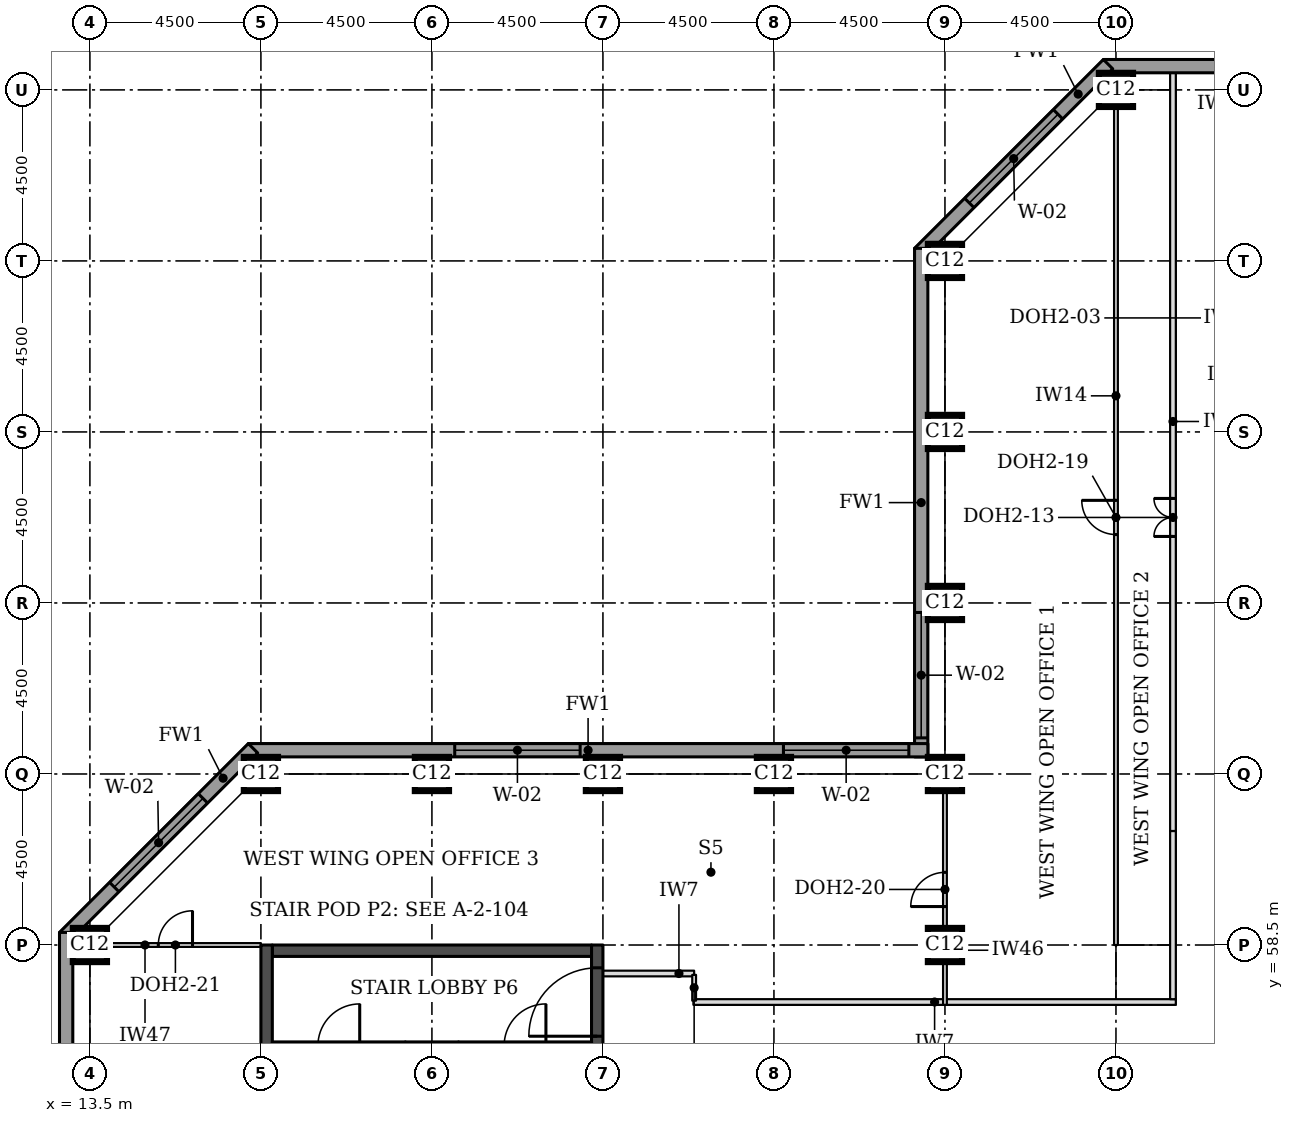
"""IFC4 building model, lengths in metres.
Left out: names, types, materials, properties, quantities, classifications, styles, units other than length and angle.
Written with IfcOpenShell. Run it as: python <this file> out.ifc"""

import sys

from ifc_helpers import new_model, si_unit, direction, frame, frame_2d, origin, origin_2d, place, context, subcontext, project, spatial, rectangle, extrude, element, fill, save


model = new_model("IFC4")
c1 = context("Model", 3, precision=1e-05, world=origin(), true_north=direction((0.0, 1.0)))
c2 = subcontext(c1, "Body", "Model", "MODEL_VIEW")
j1 = project(units=[si_unit("LENGTHUNIT", "METRE"), si_unit("PLANEANGLEUNIT", "RADIAN")], contexts=[c1])
p1 = place(None, origin())
s1 = spatial("IfcSite", under=j1, at=p1, CompositionType="ELEMENT")
p2 = place(p1, origin())
s2 = spatial("IfcBuilding", under=s1, at=p2, CompositionType="ELEMENT")
p3 = place(p2, frame((0.0, 0.0, 155.1)))
s3 = spatial("IfcBuildingStorey", under=s2, at=p3, CompositionType="ELEMENT", Elevation=155.1)
for number, where, z_axis, x_axis in (
    (1, (13.5, 58.5, 0.0), (0.0, 0.0, 1.0), (1.0, 0.0, 0.0)),
    (2, (36.0, 58.5, 0.0), (0.0, 0.0, 1.0), (1.0, 0.0, 0.0)),
    (3, (18.0, 63.0, 0.0), (0.0, 0.0, 1.0), (1.0, 0.0, 0.0)),
    (4, (22.5, 63.0, 0.0), (0.0, 0.0, 1.0), (1.0, 0.0, 0.0)),
    (5, (27.0, 63.0, 0.0), (0.0, 0.0, 1.0), (1.0, 0.0, 0.0)),
    (6, (31.5, 63.0, 0.0), (0.0, 0.0, 1.0), (1.0, 0.0, 0.0)),
    (7, (36.0, 63.0, 0.0), (0.0, 0.0, 1.0), (1.0, 0.0, 0.0)),
    (8, (36.0, 67.5, 0.0), (0.0, 0.0, 1.0), (1.0, 0.0, 0.0)),
    (9, (36.0, 72.0, 0.0), (0.0, 0.0, 1.0), (1.0, 0.0, 0.0)),
    (10, (36.0, 76.5, 0.0), (0.0, 0.0, 1.0), (1.0, 0.0, 0.0)),
    (11, (40.5, 81.0, 0.0), (0.0, 0.0, 1.0), (1.0, 0.0, 0.0)),
):
    element("IfcColumn", number, at=place(p3, frame(where, z_axis=z_axis, x_axis=x_axis)), inside=s3, PredefinedType="COLUMN", context=c2, shape_type="SweptSolid", body=[
        extrude(rectangle(XDim=0.9, YDim=0.9, at=origin_2d()), origin(), (0.0, 0.0, 1.0), 3.7),
    ])
p4 = place(p3, frame((18.3, 58.35, 0.0), z_axis=(0.0, 0.0, 1.0), x_axis=(1.0, 0.0, 0.0)))
e12 = element("IfcWall", 12, at=p4, inside=s3, PredefinedType="SHEAR", context=c2, shape_type="SweptSolid", body=[
    extrude(rectangle(XDim=8.4, YDim=0.3, at=frame_2d((4.2, 0.0))), origin(), (0.0, 0.0, 1.0), 3.7),
])
p5 = place(p3, frame((18.15, 49.5, 0.0), z_axis=(0.0, 0.0, 1.0), x_axis=(0.0, 1.0, 0.0)))
e13 = element("IfcWall", 13, at=p5, inside=s3, PredefinedType="SHEAR", context=c2, shape_type="SweptSolid", body=[
    extrude(rectangle(XDim=9.0, YDim=0.3, at=frame_2d((4.5, 0.0))), origin(), (0.0, 0.0, 1.0), 3.7),
])
p6 = place(p3, frame((26.85, 49.5, 0.0), z_axis=(0.0, 0.0, 1.0), x_axis=(0.0, 1.0, 0.0)))
e14 = element("IfcWall", 14, at=p6, inside=s3, PredefinedType="SHEAR", context=c2, shape_type="SweptSolid", body=[
    extrude(rectangle(XDim=9.0, YDim=0.3, at=frame_2d((4.5, 0.0))), origin(), (0.0, 0.0, 1.0), 3.7),
])
p7 = place(p6, frame((6.6, 0.0, 0.0)))
e15 = element("IfcOpeningElement", 15, at=p7, cuts=e14, PredefinedType="OPENING", context=c2, shape_type="SweptSolid", body=[
    extrude(rectangle(XDim=1.8, YDim=2.1, at=frame_2d((0.9, 1.05))), frame((0.0, 0.16, 0.0), z_axis=(0.0, -1.0, 0.0), x_axis=(1.0, 0.0, 0.0)), (0.0, 0.0, 1.0), 0.32),
])
p8 = place(p3, frame((72.331, 81.625, 0.0), z_axis=(0.0, 0.0, 1.0), x_axis=(-1.0, 0.0, 0.0)))
e16 = element("IfcWall", 16, at=p8, inside=s3, PredefinedType="STANDARD", context=c2, shape_type="SweptSolid", body=[
    extrude(rectangle(XDim=32.163, YDim=0.35, at=frame_2d((16.081, 0.0))), origin(), (0.0, 0.0, 1.0), 3.525),
])
p9 = place(p8, frame((5.431, 0.0, 0.9)))
e17 = element("IfcOpeningElement", 17, at=p9, cuts=e16, PredefinedType="OPENING", context=c2, shape_type="SweptSolid", body=[
    extrude(rectangle(XDim=3.3, YDim=1.9, at=frame_2d((1.65, 0.95))), frame((0.0, 0.185, 0.0), z_axis=(0.0, -1.0, 0.0), x_axis=(1.0, 0.0, 0.0)), (0.0, 0.0, 1.0), 0.37),
])
p10 = place(p8, frame((9.931, 0.0, 0.9)))
e18 = element("IfcOpeningElement", 18, at=p10, cuts=e16, PredefinedType="OPENING", context=c2, shape_type="SweptSolid", body=[
    extrude(rectangle(XDim=3.3, YDim=1.9, at=frame_2d((1.65, 0.95))), frame((0.0, 0.185, 0.0), z_axis=(0.0, -1.0, 0.0), x_axis=(1.0, 0.0, 0.0)), (0.0, 0.0, 1.0), 0.37),
])
p11 = place(p8, frame((14.431, 0.0, 0.9)))
e19 = element("IfcOpeningElement", 19, at=p11, cuts=e16, PredefinedType="OPENING", context=c2, shape_type="SweptSolid", body=[
    extrude(rectangle(XDim=3.3, YDim=1.9, at=frame_2d((1.65, 0.95))), frame((0.0, 0.185, 0.0), z_axis=(0.0, -1.0, 0.0), x_axis=(1.0, 0.0, 0.0)), (0.0, 0.0, 1.0), 0.37),
])
p12 = place(p8, frame((18.931, 0.0, 0.9)))
e20 = element("IfcOpeningElement", 20, at=p12, cuts=e16, PredefinedType="OPENING", context=c2, shape_type="SweptSolid", body=[
    extrude(rectangle(XDim=3.3, YDim=1.9, at=frame_2d((1.65, 0.95))), frame((0.0, 0.185, 0.0), z_axis=(0.0, -1.0, 0.0), x_axis=(1.0, 0.0, 0.0)), (0.0, 0.0, 1.0), 0.37),
])
p13 = place(p8, frame((23.431, 0.0, 0.9)))
e21 = element("IfcOpeningElement", 21, at=p13, cuts=e16, PredefinedType="OPENING", context=c2, shape_type="SweptSolid", body=[
    extrude(rectangle(XDim=3.3, YDim=1.9, at=frame_2d((1.65, 0.95))), frame((0.0, 0.185, 0.0), z_axis=(0.0, -1.0, 0.0), x_axis=(1.0, 0.0, 0.0)), (0.0, 0.0, 1.0), 0.37),
])
p14 = place(p3, frame((40.292, 81.676, 0.0), z_axis=(0.0, 0.0, 1.0), x_axis=(-0.707106781187, -0.707106781187, 0.0)))
e22 = element("IfcWall", 22, at=p14, inside=s3, PredefinedType="STANDARD", context=c2, shape_type="SweptSolid", body=[
    extrude(rectangle(XDim=7.027, YDim=0.35, at=frame_2d((3.513, 0.0))), origin(), (0.0, 0.0, 1.0), 3.525),
])
p15 = place(p14, frame((1.863, 0.0, 0.9)))
e23 = element("IfcOpeningElement", 23, at=p15, cuts=e22, PredefinedType="OPENING", context=c2, shape_type="SweptSolid", body=[
    extrude(rectangle(XDim=3.3, YDim=1.9, at=frame_2d((1.65, 0.95))), frame((0.0, 0.185, 0.0), z_axis=(0.0, -1.0, 0.0), x_axis=(1.0, 0.0, 0.0)), (0.0, 0.0, 1.0), 0.37),
])
p16 = place(p3, frame((35.375, 76.831, 0.0), z_axis=(0.0, 0.0, 1.0), x_axis=(0.0, -1.0, 0.0)))
e24 = element("IfcWall", 24, at=p16, inside=s3, PredefinedType="STANDARD", context=c2, shape_type="SweptSolid", body=[
    extrude(rectangle(XDim=13.381, YDim=0.35, at=frame_2d((6.691, 0.0))), origin(), (0.0, 0.0, 1.0), 3.525),
])
p17 = place(p16, frame((9.581, 0.0, 0.9)))
e25 = element("IfcOpeningElement", 25, at=p17, cuts=e24, PredefinedType="OPENING", context=c2, shape_type="SweptSolid", body=[
    extrude(rectangle(XDim=3.3, YDim=1.9, at=frame_2d((1.65, 0.95))), frame((0.0, 0.185, 0.0), z_axis=(0.0, -1.0, 0.0), x_axis=(1.0, 0.0, 0.0)), (0.0, 0.0, 1.0), 0.37),
])
p18 = place(p3, frame((35.55, 63.625, 0.0), z_axis=(0.0, 0.0, 1.0), x_axis=(-1.0, 0.0, 0.0)))
e26 = element("IfcWall", 26, at=p18, inside=s3, PredefinedType="STANDARD", context=c2, shape_type="SweptSolid", body=[
    extrude(rectangle(XDim=17.881, YDim=0.35, at=frame_2d((8.941, 0.0))), origin(), (0.0, 0.0, 1.0), 3.525),
])
p19 = place(p18, frame((0.5, 0.0, 0.9)))
e27 = element("IfcOpeningElement", 27, at=p19, cuts=e26, PredefinedType="OPENING", context=c2, shape_type="SweptSolid", body=[
    extrude(rectangle(XDim=3.3, YDim=1.9, at=frame_2d((1.65, 0.95))), frame((0.0, 0.185, 0.0), z_axis=(0.0, -1.0, 0.0), x_axis=(1.0, 0.0, 0.0)), (0.0, 0.0, 1.0), 0.37),
])
p20 = place(p18, frame((9.15, 0.0, 0.9)))
e28 = element("IfcOpeningElement", 28, at=p20, cuts=e26, PredefinedType="OPENING", context=c2, shape_type="SweptSolid", body=[
    extrude(rectangle(XDim=3.3, YDim=1.9, at=frame_2d((1.65, 0.95))), frame((0.0, 0.185, 0.0), z_axis=(0.0, -1.0, 0.0), x_axis=(1.0, 0.0, 0.0)), (0.0, 0.0, 1.0), 0.37),
])
p21 = place(p3, frame((17.792, 63.676, 0.0), z_axis=(0.0, 0.0, 1.0), x_axis=(-0.707106781187, -0.707106781187, 0.0)))
e29 = element("IfcWall", 29, at=p21, inside=s3, PredefinedType="STANDARD", context=c2, shape_type="SweptSolid", body=[
    extrude(rectangle(XDim=7.027, YDim=0.35, at=frame_2d((3.513, 0.0))), origin(), (0.0, 0.0, 1.0), 3.525),
])
p22 = place(p21, frame((1.863, 0.0, 0.9)))
e30 = element("IfcOpeningElement", 30, at=p22, cuts=e29, PredefinedType="OPENING", context=c2, shape_type="SweptSolid", body=[
    extrude(rectangle(XDim=3.3, YDim=1.9, at=frame_2d((1.65, 0.95))), frame((0.0, 0.185, 0.0), z_axis=(0.0, -1.0, 0.0), x_axis=(1.0, 0.0, 0.0)), (0.0, 0.0, 1.0), 0.37),
])
p23 = place(p3, frame((12.875, 58.831, 0.0), z_axis=(0.0, 0.0, 1.0), x_axis=(0.0, -1.0, 0.0)))
e31 = element("IfcWall", 31, at=p23, inside=s3, PredefinedType="STANDARD", context=c2, shape_type="SweptSolid", body=[
    extrude(rectangle(XDim=14.163, YDim=0.35, at=frame_2d((7.081, 0.0))), origin(), (0.0, 0.0, 1.0), 3.525),
])
p24 = place(p23, frame((5.431, 0.0, 0.9)))
e32 = element("IfcOpeningElement", 32, at=p24, cuts=e31, PredefinedType="OPENING", context=c2, shape_type="SweptSolid", body=[
    extrude(rectangle(XDim=3.3, YDim=1.9, at=frame_2d((1.65, 0.95))), frame((0.0, 0.185, 0.0), z_axis=(0.0, -1.0, 0.0), x_axis=(1.0, 0.0, 0.0)), (0.0, 0.0, 1.0), 0.37),
])
p25 = place(p3, frame((29.38, 57.0, 0.0), z_axis=(0.0, 0.0, 1.0), x_axis=(1.0, 0.0, 0.0)))
e33 = element("IfcWall", 33, at=p25, inside=s3, PredefinedType="PARTITIONING", context=c2, shape_type="SweptSolid", body=[
    extrude(rectangle(XDim=12.695, YDim=0.15, at=frame_2d((6.348, 0.0))), origin(), (0.0, 0.0, 1.0), 3.55),
])
p26 = place(p3, frame((42.0, 57.075, 0.0), z_axis=(0.0, 0.0, 1.0), x_axis=(0.0, 1.0, 0.0)))
e34 = element("IfcWall", 34, at=p26, inside=s3, PredefinedType="PARTITIONING", context=c2, shape_type="SweptSolid", body=[
    extrude(rectangle(XDim=4.425, YDim=0.15, at=frame_2d((2.212, 0.0))), origin(), (0.0, 0.0, 1.0), 3.55),
])
p27 = place(p3, frame((42.0, 61.5, 0.0), z_axis=(0.0, 0.0, 1.0), x_axis=(0.0, 1.0, 0.0)))
e35 = element("IfcWall", 35, at=p27, inside=s3, PredefinedType="PARTITIONING", context=c2, shape_type="SweptSolid", body=[
    extrude(rectangle(XDim=19.95, YDim=0.15, at=frame_2d((9.975, 0.0))), origin(), (0.0, 0.0, 1.0), 3.55),
])
p28 = place(p27, frame((7.75, 0.0, 0.0)))
e36 = element("IfcOpeningElement", 36, at=p28, cuts=e35, PredefinedType="OPENING", context=c2, shape_type="SweptSolid", body=[
    extrude(rectangle(XDim=1.0, YDim=2.1, at=frame_2d((0.5, 1.05))), frame((0.0, 0.085, 0.0), z_axis=(0.0, -1.0, 0.0), x_axis=(1.0, 0.0, 0.0)), (0.0, 0.0, 1.0), 0.17),
])
p29 = place(p3, frame((40.5, 81.0, 0.0), z_axis=(0.0, 0.0, 1.0), x_axis=(0.0, -1.0, 0.0)))
e37 = element("IfcWall", 37, at=p29, inside=s3, PredefinedType="PARTITIONING", context=c2, shape_type="SweptSolid", body=[
    extrude(rectangle(XDim=22.5, YDim=0.1, at=frame_2d((11.25, 0.0))), origin(), (0.0, 0.0, 1.0), 3.55),
])
p30 = place(p29, frame((10.8, 0.0, 0.0)))
e38 = element("IfcOpeningElement", 38, at=p30, cuts=e37, PredefinedType="OPENING", context=c2, shape_type="SweptSolid", body=[
    extrude(rectangle(XDim=0.9, YDim=2.1, at=frame_2d((0.45, 1.05))), frame((0.0, 0.06, 0.0), z_axis=(0.0, -1.0, 0.0), x_axis=(1.0, 0.0, 0.0)), (0.0, 0.0, 1.0), 0.12),
])
p31 = place(p3, frame((36.0, 63.0, 0.0), z_axis=(0.0, 0.0, 1.0), x_axis=(0.0, -1.0, 0.0)))
e39 = element("IfcWall", 39, at=p31, inside=s3, PredefinedType="PARTITIONING", context=c2, shape_type="SweptSolid", body=[
    extrude(rectangle(XDim=6.075, YDim=0.1, at=frame_2d((3.038, 0.0))), origin(), (0.0, 0.0, 1.0), 2.8),
])
p32 = place(p31, frame((2.588, 0.0, 0.0)))
e40 = element("IfcOpeningElement", 40, at=p32, cuts=e39, PredefinedType="OPENING", context=c2, shape_type="SweptSolid", body=[
    extrude(rectangle(XDim=0.9, YDim=2.1, at=frame_2d((0.45, 1.05))), frame((0.0, 0.06, 0.0), z_axis=(0.0, -1.0, 0.0), x_axis=(1.0, 0.0, 0.0)), (0.0, 0.0, 1.0), 0.12),
])
p33 = place(p3, frame((13.5, 58.5, 0.0), z_axis=(0.0, 0.0, 1.0), x_axis=(1.0, 0.0, 0.0)))
e41 = element("IfcWall", 41, at=p33, inside=s3, PredefinedType="PARTITIONING", context=c2, shape_type="SweptSolid", body=[
    extrude(rectangle(XDim=4.5, YDim=0.1, at=frame_2d((2.25, 0.0))), origin(), (0.0, 0.0, 1.0), 2.55),
])
p34 = place(p33, frame((1.8, 0.0, 0.0)))
e42 = element("IfcOpeningElement", 42, at=p34, cuts=e41, PredefinedType="OPENING", context=c2, shape_type="SweptSolid", body=[
    extrude(rectangle(XDim=0.9, YDim=2.1, at=frame_2d((0.45, 1.05))), frame((0.0, 0.06, 0.0), z_axis=(0.0, -1.0, 0.0), x_axis=(1.0, 0.0, 0.0)), (0.0, 0.0, 1.0), 0.12),
])
p35 = place(p3, frame((27.0, 57.75, 0.0), z_axis=(0.0, 0.0, 1.0), x_axis=(1.0, 0.0, 0.0)))
e43 = element("IfcWall", 43, at=p35, inside=s3, PredefinedType="PARTITIONING", context=c2, shape_type="SweptSolid", body=[
    extrude(rectangle(XDim=2.4, YDim=0.15, at=frame_2d((1.2, 0.0))), origin(), (0.0, 0.0, 1.0), 3.55),
])
p36 = place(p3, frame((29.4, 57.715, 0.0), z_axis=(0.0, 0.0, 1.0), x_axis=(0.0, -1.0, 0.0)))
e44 = element("IfcWall", 44, at=p36, inside=s3, PredefinedType="PARTITIONING", context=c2, shape_type="SweptSolid", body=[
    extrude(rectangle(XDim=0.68, YDim=0.1, at=frame_2d((0.34, 0.0))), origin(), (0.0, 0.0, 1.0), 3.55),
])
p37 = place(p3, frame((21.8, 55.85, 0.0), z_axis=(0.0, 0.0, 1.0), x_axis=(1.0, 0.0, 0.0)))
e45 = element("IfcWall", 45, at=p37, inside=s3, PredefinedType="SOLIDWALL", context=c2, shape_type="SweptSolid", body=[
    extrude(rectangle(XDim=1.4, YDim=0.2, at=frame_2d((0.7, 0.0))), origin(), (0.0, 0.0, 1.0), 3.55),
])
p38 = place(p3, frame((18.3, 55.85, 0.0), z_axis=(0.0, 0.0, 1.0), x_axis=(1.0, 0.0, 0.0)))
e46 = element("IfcWall", 46, at=p38, inside=s3, PredefinedType="SOLIDWALL", context=c2, shape_type="SweptSolid", body=[
    extrude(rectangle(XDim=3.5, YDim=0.2, at=frame_2d((1.75, 0.0))), origin(), (0.0, 0.0, 1.0), 3.55),
])
p39 = place(p38, frame((1.2, 0.0, 0.0)))
e47 = element("IfcOpeningElement", 47, at=p39, cuts=e46, PredefinedType="OPENING", context=c2, shape_type="SweptSolid", body=[
    extrude(rectangle(XDim=1.1, YDim=2.1, at=frame_2d((0.55, 1.05))), frame((0.0, 0.11, 0.0), z_axis=(0.0, -1.0, 0.0), x_axis=(1.0, 0.0, 0.0)), (0.0, 0.0, 1.0), 0.22),
])
p40 = place(p3, frame((23.2, 55.85, 0.0), z_axis=(0.0, 0.0, 1.0), x_axis=(1.0, 0.0, 0.0)))
e48 = element("IfcWall", 48, at=p40, inside=s3, PredefinedType="SOLIDWALL", context=c2, shape_type="SweptSolid", body=[
    extrude(rectangle(XDim=3.5, YDim=0.2, at=frame_2d((1.75, 0.0))), origin(), (0.0, 0.0, 1.0), 3.55),
])
p41 = place(p40, frame((1.2, 0.0, 0.0)))
e49 = element("IfcOpeningElement", 49, at=p41, cuts=e48, PredefinedType="OPENING", context=c2, shape_type="SweptSolid", body=[
    extrude(rectangle(XDim=1.1, YDim=2.1, at=frame_2d((0.55, 1.05))), frame((0.0, 0.11, 0.0), z_axis=(0.0, -1.0, 0.0), x_axis=(1.0, 0.0, 0.0)), (0.0, 0.0, 1.0), 0.22),
])
p42 = place(p15, origin())
e50 = element("IfcWindow", 50, at=p42, inside=s3, PartitioningType="SINGLE_PANEL", PredefinedType="WINDOW", context=c2, shape_type="SweptSolid", body=[
    extrude(rectangle(XDim=3.3, YDim=1.9, at=frame_2d((1.65, 0.95))), frame((0.0, 0.085, 0.0), z_axis=(0.0, -1.0, 0.0), x_axis=(1.0, 0.0, 0.0)), (0.0, 0.0, 1.0), 0.06),
])
fill(e23, e50)
p43 = place(p17, origin())
e51 = element("IfcWindow", 51, at=p43, inside=s3, PartitioningType="SINGLE_PANEL", PredefinedType="WINDOW", context=c2, shape_type="SweptSolid", body=[
    extrude(rectangle(XDim=3.3, YDim=1.9, at=frame_2d((1.65, 0.95))), frame((0.0, 0.085, 0.0), z_axis=(0.0, -1.0, 0.0), x_axis=(1.0, 0.0, 0.0)), (0.0, 0.0, 1.0), 0.06),
])
fill(e25, e51)
p44 = place(p19, origin())
e52 = element("IfcWindow", 52, at=p44, inside=s3, PartitioningType="SINGLE_PANEL", PredefinedType="WINDOW", context=c2, shape_type="SweptSolid", body=[
    extrude(rectangle(XDim=3.3, YDim=1.9, at=frame_2d((1.65, 0.95))), frame((0.0, 0.085, 0.0), z_axis=(0.0, -1.0, 0.0), x_axis=(1.0, 0.0, 0.0)), (0.0, 0.0, 1.0), 0.06),
])
fill(e27, e52)
p45 = place(p20, origin())
e53 = element("IfcWindow", 53, at=p45, inside=s3, PartitioningType="SINGLE_PANEL", PredefinedType="WINDOW", context=c2, shape_type="SweptSolid", body=[
    extrude(rectangle(XDim=3.3, YDim=1.9, at=frame_2d((1.65, 0.95))), frame((0.0, 0.085, 0.0), z_axis=(0.0, -1.0, 0.0), x_axis=(1.0, 0.0, 0.0)), (0.0, 0.0, 1.0), 0.06),
])
fill(e28, e53)
p46 = place(p22, origin())
e54 = element("IfcWindow", 54, at=p46, inside=s3, PartitioningType="SINGLE_PANEL", PredefinedType="WINDOW", context=c2, shape_type="SweptSolid", body=[
    extrude(rectangle(XDim=3.3, YDim=1.9, at=frame_2d((1.65, 0.95))), frame((0.0, 0.085, 0.0), z_axis=(0.0, -1.0, 0.0), x_axis=(1.0, 0.0, 0.0)), (0.0, 0.0, 1.0), 0.06),
])
fill(e30, e54)
p47 = place(p28, origin())
e55 = element("IfcDoor", 55, at=p47, inside=s3, OperationType="DOUBLE_DOOR_SINGLE_SWING", PredefinedType="DOOR", context=c2, shape_type="SweptSolid", body=[
    extrude(rectangle(XDim=1.0, YDim=2.1, at=frame_2d((0.5, 1.05))), frame((0.0, 0.025, 0.0), z_axis=(0.0, -1.0, 0.0), x_axis=(1.0, 0.0, 0.0)), (0.0, 0.0, 1.0), 0.05),
])
fill(e36, e55)
p48 = place(p30, frame((0.9, 0.0, 0.0), z_axis=(0.0, 0.0, 1.0), x_axis=(-1.0, 0.0, 0.0)))
e56 = element("IfcDoor", 56, at=p48, inside=s3, OperationType="SINGLE_SWING_RIGHT", PredefinedType="DOOR", context=c2, shape_type="SweptSolid", body=[
    extrude(rectangle(XDim=0.9, YDim=2.1, at=frame_2d((0.45, 1.05))), frame((0.0, 0.025, 0.0), z_axis=(0.0, -1.0, 0.0), x_axis=(1.0, 0.0, 0.0)), (0.0, 0.0, 1.0), 0.05),
])
fill(e38, e56)
p49 = place(p32, frame((0.9, 0.0, 0.0), z_axis=(0.0, 0.0, 1.0), x_axis=(-1.0, 0.0, 0.0)))
e57 = element("IfcDoor", 57, at=p49, inside=s3, OperationType="SINGLE_SWING_LEFT", PredefinedType="DOOR", context=c2, shape_type="SweptSolid", body=[
    extrude(rectangle(XDim=0.9, YDim=2.1, at=frame_2d((0.45, 1.05))), frame((0.0, 0.025, 0.0), z_axis=(0.0, -1.0, 0.0), x_axis=(1.0, 0.0, 0.0)), (0.0, 0.0, 1.0), 0.05),
])
fill(e40, e57)
p50 = place(p34, origin())
e58 = element("IfcDoor", 58, at=p50, inside=s3, OperationType="SINGLE_SWING_RIGHT", PredefinedType="DOOR", context=c2, shape_type="SweptSolid", body=[
    extrude(rectangle(XDim=0.9, YDim=2.1, at=frame_2d((0.45, 1.05))), frame((0.0, 0.025, 0.0), z_axis=(0.0, -1.0, 0.0), x_axis=(1.0, 0.0, 0.0)), (0.0, 0.0, 1.0), 0.05),
])
fill(e42, e58)
p51 = place(p7, origin())
e59 = element("IfcDoor", 59, at=p51, inside=s3, OperationType="SINGLE_SWING_LEFT", PredefinedType="DOOR", context=c2, shape_type="SweptSolid", body=[
    extrude(rectangle(XDim=1.8, YDim=2.1, at=frame_2d((0.9, 1.05))), frame((0.0, 0.025, 0.0), z_axis=(0.0, -1.0, 0.0), x_axis=(1.0, 0.0, 0.0)), (0.0, 0.0, 1.0), 0.05),
])
fill(e15, e59)
save(model, sys.argv[1])
